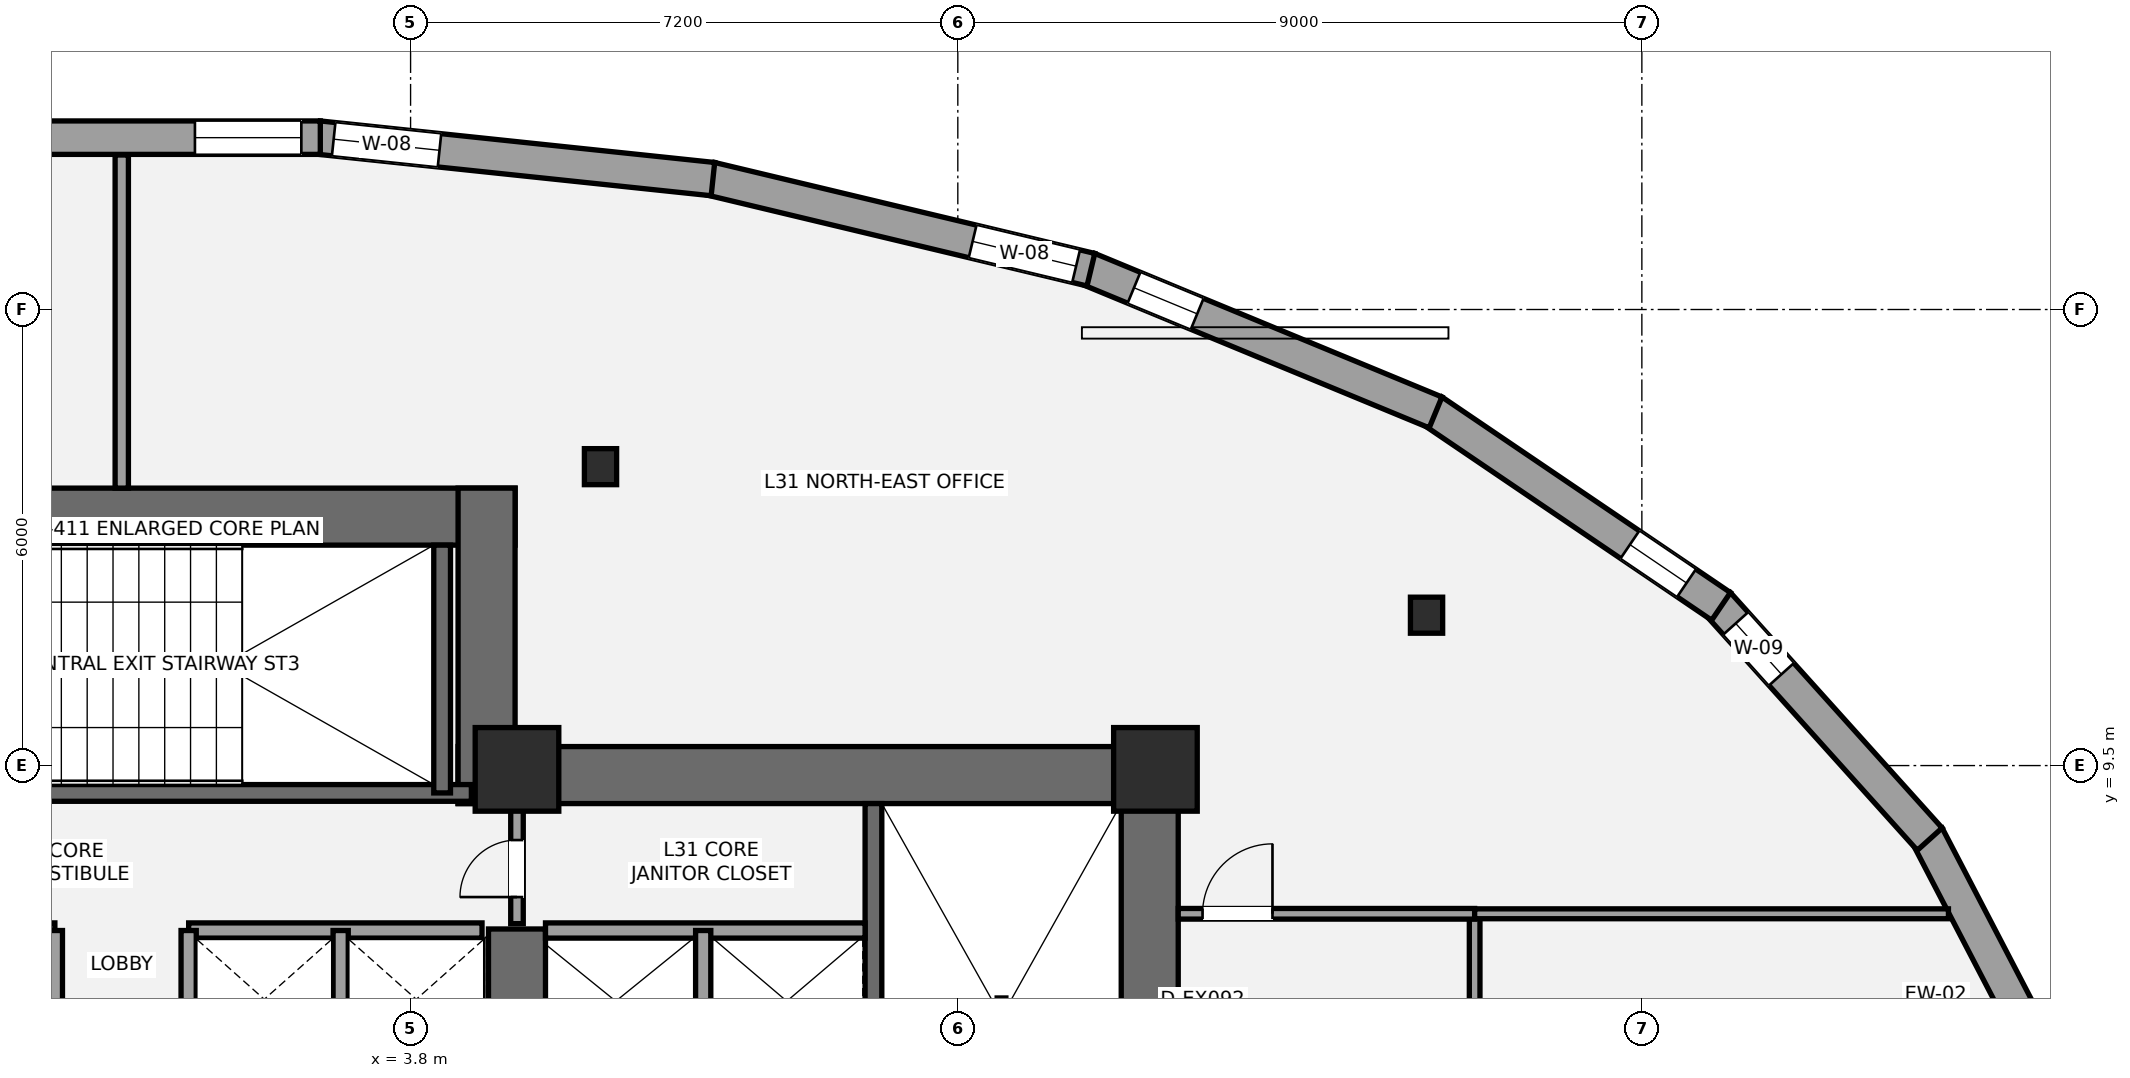
"""IFC4 building model, lengths in metres.
Left out: names, types, materials, properties, quantities, classifications, styles, units other than length and angle.
Written with IfcOpenShell. Run it as: python <this file> out.ifc"""

import sys

from ifc_helpers import new_model, si_unit, direction, frame, frame_2d, origin, origin_2d, place, context, subcontext, project, spatial, rectangle, i_section, extrude, element, fill, save


model = new_model("IFC4")
c1 = context("Model", 3, precision=1e-05, world=origin(), true_north=direction((0.0, 1.0)))
c2 = subcontext(c1, "Body", "Model", "MODEL_VIEW")
j1 = project(units=[si_unit("LENGTHUNIT", "METRE"), si_unit("PLANEANGLEUNIT", "RADIAN")], contexts=[c1])
p1 = place(None, origin())
s1 = spatial("IfcSite", under=j1, at=p1, CompositionType="ELEMENT")
p2 = place(p1, origin())
s2 = spatial("IfcBuilding", under=s1, at=p2, CompositionType="ELEMENT")
p3 = place(p2, frame((0.0, 0.0, 117.6)))
s3 = spatial("IfcBuildingStorey", under=s2, at=p3, CompositionType="ELEMENT", Elevation=117.6)
p4 = place(p3, frame((13.525, 1.1, 0.0), z_axis=(0.0, 0.0, 1.0), x_axis=(0.0, 1.0, 0.0)))
e1 = element("IfcWall", 1, at=p4, inside=s3, PredefinedType="SHEAR", context=c2, shape_type="SweptSolid", body=[
    extrude(rectangle(XDim=8.65, YDim=0.75, at=frame_2d((4.325, 0.0))), origin(), (0.0, 0.0, 1.0), 3.5),
])
p5 = place(p3, frame((4.425, 9.375, 0.0), z_axis=(0.0, 0.0, 1.0), x_axis=(1.0, 0.0, 0.0)))
e2 = element("IfcWall", 2, at=p5, inside=s3, PredefinedType="SHEAR", context=c2, shape_type="SweptSolid", body=[
    extrude(rectangle(XDim=9.475, YDim=0.75, at=frame_2d((4.737, 0.0))), origin(), (0.0, 0.0, 1.0), 3.5),
])
p6 = place(p3, frame((5.2, 5.35, 0.0), z_axis=(0.0, 0.0, 1.0), x_axis=(0.0, 1.0, 0.0)))
e3 = element("IfcWall", 3, at=p6, inside=s3, PredefinedType="SHEAR", context=c2, shape_type="SweptSolid", body=[
    extrude(rectangle(XDim=2.0, YDim=0.75, at=frame_2d((1.0, 0.0))), origin(), (0.0, 0.0, 1.0), 3.5),
])
p7 = place(p3, frame((9.89, 1.85, 0.0), z_axis=(0.0, 0.0, 1.0), x_axis=(0.0, 1.0, 0.0)))
e4 = element("IfcWall", 4, at=p7, inside=s3, PredefinedType="SHEAR", context=c2, shape_type="SweptSolid", body=[
    extrude(rectangle(XDim=7.15, YDim=0.22, at=frame_2d((3.575, 0.0))), origin(), (0.0, 0.0, 1.0), 3.5),
])
p8 = place(p3, frame((-5.175, 12.775, 0.0), z_axis=(0.0, 0.0, 1.0), x_axis=(1.0, 0.0, 0.0)))
e5 = element("IfcWall", 5, at=p8, inside=s3, PredefinedType="SHEAR", context=c2, shape_type="SweptSolid", body=[
    extrude(rectangle(XDim=10.35, YDim=0.75, at=frame_2d((5.175, 0.0))), origin(), (0.0, 0.0, 1.0), 3.5),
])
p9 = place(p3, frame((4.8, 9.0, 0.0), z_axis=(0.0, 0.0, 1.0), x_axis=(0.0, 1.0, 0.0)))
e6 = element("IfcWall", 6, at=p9, inside=s3, PredefinedType="SHEAR", context=c2, shape_type="SweptSolid", body=[
    extrude(rectangle(XDim=4.15, YDim=0.75, at=frame_2d((2.075, 0.0))), origin(), (0.0, 0.0, 1.0), 3.5),
])
p10 = place(p3, frame((-4.7, 9.14, 0.0), z_axis=(0.0, 0.0, 1.0), x_axis=(1.0, 0.0, 0.0)))
e7 = element("IfcWall", 7, at=p10, inside=s3, PredefinedType="SHEAR", context=c2, shape_type="SweptSolid", body=[
    extrude(rectangle(XDim=9.3, YDim=0.22, at=frame_2d((4.65, 0.0))), origin(), (0.0, 0.0, 1.0), 3.5),
])
p11 = place(p10, frame((1.15, 0.0, 0.0)))
e8 = element("IfcOpeningElement", 8, at=p11, cuts=e7, PredefinedType="OPENING", context=c2, shape_type="SweptSolid", body=[
    extrude(rectangle(XDim=1.05, YDim=2.15, at=frame_2d((0.525, 1.075))), frame((0.0, 0.12, 0.0), z_axis=(0.0, -1.0, 0.0), x_axis=(1.0, 0.0, 0.0)), (0.0, 0.0, 1.0), 0.24),
])
p12 = place(p3, frame((4.215, 9.14, 0.0), z_axis=(0.0, 0.0, 1.0), x_axis=(0.0, 1.0, 0.0)))
e9 = element("IfcWall", 9, at=p12, inside=s3, PredefinedType="SHEAR", context=c2, shape_type="SweptSolid", body=[
    extrude(rectangle(XDim=3.26, YDim=0.22, at=frame_2d((1.63, 0.0))), origin(), (0.0, 0.0, 1.0), 3.5),
])
for number, where, z_axis, x_axis in (
    (10, (5.2, 9.45, 0.0), (0.0, 0.0, 1.0), (1.0, 0.0, 0.0)),
    (11, (13.6, 9.45, 0.0), (0.0, 0.0, 1.0), (1.0, 0.0, 0.0)),
):
    element("IfcColumn", number, at=place(p3, frame(where, z_axis=z_axis, x_axis=x_axis)), inside=s3, PredefinedType="COLUMN", context=c2, shape_type="SweptSolid", body=[
        extrude(rectangle(XDim=1.1, YDim=1.1, at=origin_2d()), origin(), (0.0, 0.0, 1.0), 3.5),
    ])
for number, where, z_axis, x_axis in (
    (12, (17.167, 11.478, 0.0), (0.0, 0.0, 1.0), (1.0, 0.0, 0.0)),
    (13, (6.299, 13.433, 0.0), (0.0, 0.0, 1.0), (1.0, 0.0, 0.0)),
):
    element("IfcColumn", number, at=place(p3, frame(where, z_axis=z_axis, x_axis=x_axis)), inside=s3, PredefinedType="COLUMN", context=c2, shape_type="SweptSolid", body=[
        extrude(i_section(OverallWidth=0.424, OverallDepth=0.474, WebThickness=0.048, FlangeThickness=0.077, at=origin_2d()), origin(), (0.0, 0.0, 1.0), 3.5),
    ])
p13 = place(p3, frame((23.756, 8.578, 0.0), z_axis=(0.0, 0.0, 1.0), x_axis=(0.461766944701, -0.88700129018, 0.0)))
e14 = element("IfcWall", 14, at=p13, inside=s3, PredefinedType="STANDARD", context=c2, shape_type="SweptSolid", body=[
    extrude(rectangle(XDim=3.823, YDim=0.44, at=frame_2d((1.911, 0.0))), origin(), (0.0, 0.0, 1.0), 2.528),
])
p14 = place(p13, frame((2.673, 0.0, 0.58)))
e15 = element("IfcOpeningElement", 15, at=p14, cuts=e14, PredefinedType="OPENING", context=c2, shape_type="SweptSolid", body=[
    extrude(rectangle(XDim=0.9, YDim=1.35, at=frame_2d((0.45, 0.675))), frame((0.0, 0.23, 0.0), z_axis=(0.0, -1.0, 0.0), x_axis=(1.0, 0.0, 0.0)), (0.0, 0.0, 1.0), 0.46),
])
p15 = place(p3, frame((21.002, 11.629, 0.0), z_axis=(0.0, 0.0, 1.0), x_axis=(0.668754222456, -0.743483550556, 0.0)))
e16 = element("IfcWall", 16, at=p15, inside=s3, PredefinedType="STANDARD", context=c2, shape_type="SweptSolid", body=[
    extrude(rectangle(XDim=4.166, YDim=0.44, at=frame_2d((2.083, 0.0))), origin(), (0.0, 0.0, 1.0), 2.528),
])
p16 = place(p15, frame((0.348, 0.0, 0.58)))
e17 = element("IfcOpeningElement", 17, at=p16, cuts=e16, PredefinedType="OPENING", context=c2, shape_type="SweptSolid", body=[
    extrude(rectangle(XDim=0.9, YDim=1.35, at=frame_2d((0.45, 0.675))), frame((0.0, 0.23, 0.0), z_axis=(0.0, -1.0, 0.0), x_axis=(1.0, 0.0, 0.0)), (0.0, 0.0, 1.0), 0.46),
])
p17 = place(p3, frame((17.247, 14.167, 0.0), z_axis=(0.0, 0.0, 1.0), x_axis=(0.827700115196, -0.561170668607, 0.0)))
e18 = element("IfcWall", 18, at=p17, inside=s3, PredefinedType="STANDARD", context=c2, shape_type="SweptSolid", body=[
    extrude(rectangle(XDim=4.585, YDim=0.44, at=frame_2d((2.293, 0.0))), origin(), (0.0, 0.0, 1.0), 2.528),
])
p18 = place(p17, frame((3.137, 0.0, 0.58)))
e19 = element("IfcOpeningElement", 19, at=p18, cuts=e18, PredefinedType="OPENING", context=c2, shape_type="SweptSolid", body=[
    extrude(rectangle(XDim=0.9, YDim=1.35, at=frame_2d((0.45, 0.675))), frame((0.0, 0.23, 0.0), z_axis=(0.0, -1.0, 0.0), x_axis=(1.0, 0.0, 0.0)), (0.0, 0.0, 1.0), 0.46),
])
p19 = place(p3, frame((12.718, 16.034, 0.0), z_axis=(0.0, 0.0, 1.0), x_axis=(0.924140141084, -0.382053660678, 0.0)))
e20 = element("IfcWall", 20, at=p19, inside=s3, PredefinedType="STANDARD", context=c2, shape_type="SweptSolid", body=[
    extrude(rectangle(XDim=4.943, YDim=0.44, at=frame_2d((2.471, 0.0))), origin(), (0.0, 0.0, 1.0), 2.528),
])
p20 = place(p19, frame((0.649, 0.0, 0.58)))
e21 = element("IfcOpeningElement", 21, at=p20, cuts=e20, PredefinedType="OPENING", context=c2, shape_type="SweptSolid", body=[
    extrude(rectangle(XDim=0.9, YDim=1.35, at=frame_2d((0.45, 0.675))), frame((0.0, 0.23, 0.0), z_axis=(0.0, -1.0, 0.0), x_axis=(1.0, 0.0, 0.0)), (0.0, 0.0, 1.0), 0.46),
])
p21 = place(p3, frame((7.75, 17.22, 0.0), z_axis=(0.0, 0.0, 1.0), x_axis=(0.972539655933, -0.232737228734, 0.0)))
e22 = element("IfcWall", 22, at=p21, inside=s3, PredefinedType="STANDARD", context=c2, shape_type="SweptSolid", body=[
    extrude(rectangle(XDim=5.142, YDim=0.44, at=frame_2d((2.571, 0.0))), origin(), (0.0, 0.0, 1.0), 2.528),
])
p22 = place(p21, frame((3.542, 0.0, 0.58)))
e23 = element("IfcOpeningElement", 23, at=p22, cuts=e22, PredefinedType="OPENING", context=c2, shape_type="SweptSolid", body=[
    extrude(rectangle(XDim=1.4, YDim=1.55, at=frame_2d((0.7, 0.775))), frame((0.0, 0.23, 0.0), z_axis=(0.0, -1.0, 0.0), x_axis=(1.0, 0.0, 0.0)), (0.0, 0.0, 1.0), 0.46),
])
p23 = place(p3, frame((2.589, 17.762, 0.0), z_axis=(0.0, 0.0, 1.0), x_axis=(0.994501349718, -0.104723757619, 0.0)))
e24 = element("IfcWall", 24, at=p23, inside=s3, PredefinedType="STANDARD", context=c2, shape_type="SweptSolid", body=[
    extrude(rectangle(XDim=5.218, YDim=0.44, at=frame_2d((2.609, 0.0))), origin(), (0.0, 0.0, 1.0), 2.528),
])
p24 = place(p23, frame((0.2, 0.0, 0.58)))
e25 = element("IfcOpeningElement", 25, at=p24, cuts=e24, PredefinedType="OPENING", context=c2, shape_type="SweptSolid", body=[
    extrude(rectangle(XDim=1.4, YDim=1.55, at=frame_2d((0.7, 0.775))), frame((0.0, 0.23, 0.0), z_axis=(0.0, -1.0, 0.0), x_axis=(1.0, 0.0, 0.0)), (0.0, 0.0, 1.0), 0.46),
])
p25 = place(p3, frame((-2.612, 17.761, 0.0), z_axis=(0.0, 0.0, 1.0), x_axis=(1.0, 0.0, 0.0)))
e26 = element("IfcWall", 26, at=p25, inside=s3, PredefinedType="STANDARD", context=c2, shape_type="SweptSolid", body=[
    extrude(rectangle(XDim=5.225, YDim=0.44, at=frame_2d((2.612, 0.0))), origin(), (0.0, 0.0, 1.0), 2.528),
])
p26 = place(p25, frame((3.575, 0.0, 0.58)))
e27 = element("IfcOpeningElement", 27, at=p26, cuts=e26, PredefinedType="OPENING", context=c2, shape_type="SweptSolid", body=[
    extrude(rectangle(XDim=1.4, YDim=1.55, at=frame_2d((0.7, 0.775))), frame((0.0, 0.23, 0.0), z_axis=(0.0, -1.0, 0.0), x_axis=(1.0, 0.0, 0.0)), (0.0, 0.0, 1.0), 0.46),
])
p27 = place(p3, frame((5.575, 7.33, 0.0), z_axis=(0.0, 0.0, 1.0), x_axis=(1.0, 0.0, 0.0)))
e28 = element("IfcWall", 28, at=p27, inside=s3, PredefinedType="SOLIDWALL", context=c2, shape_type="SweptSolid", body=[
    extrude(rectangle(XDim=4.205, YDim=0.2, at=frame_2d((2.103, 0.0))), origin(), (0.0, 0.0, 1.0), 3.31),
])
p28 = place(p3, frame((7.65, 5.47, 0.0), z_axis=(0.0, 0.0, 1.0), x_axis=(0.0, 1.0, 0.0)))
e29 = element("IfcWall", 29, at=p28, inside=s3, PredefinedType="SOLIDWALL", context=c2, shape_type="SweptSolid", body=[
    extrude(rectangle(XDim=1.86, YDim=0.2, at=frame_2d((0.93, 0.0))), origin(), (0.0, 0.0, 1.0), 3.31),
])
for number, where, z_axis, x_axis in (
    (30, (-4.74, 7.33, 0.0), (0.0, 0.0, 1.0), (1.0, 0.0, 0.0)),
    (31, (0.88, 7.33, 0.0), (0.0, 0.0, 1.0), (1.0, 0.0, 0.0)),
):
    element("IfcWall", number, at=place(p3, frame(where, z_axis=z_axis, x_axis=x_axis)), inside=s3, PredefinedType="SOLIDWALL", context=c2, shape_type="SweptSolid", body=[
        extrude(rectangle(XDim=3.86, YDim=0.2, at=frame_2d((1.93, 0.0))), origin(), (0.0, 0.0, 1.0), 3.31),
    ])
for number, where, z_axis, x_axis in (
    (32, (2.88, 5.52, 0.0), (0.0, 0.0, 1.0), (0.0, 1.0, 0.0)),
    (33, (-0.88, 5.52, 0.0), (0.0, 0.0, 1.0), (0.0, 1.0, 0.0)),
    (34, (0.88, 5.52, 0.0), (0.0, 0.0, 1.0), (0.0, 1.0, 0.0)),
):
    element("IfcWall", number, at=place(p3, frame(where, z_axis=z_axis, x_axis=x_axis)), inside=s3, PredefinedType="SOLIDWALL", context=c2, shape_type="SweptSolid", body=[
        extrude(rectangle(XDim=1.81, YDim=0.2, at=frame_2d((0.905, 0.0))), origin(), (0.0, 0.0, 1.0), 3.31),
    ])
p29 = place(p3, frame((5.2, 7.42, 0.0), z_axis=(0.0, 0.0, 1.0), x_axis=(0.0, 1.0, 0.0)))
e35 = element("IfcWall", 35, at=p29, inside=s3, PredefinedType="PARTITIONING", context=c2, shape_type="SweptSolid", body=[
    extrude(rectangle(XDim=1.58, YDim=0.165, at=frame_2d((0.79, 0.0))), origin(), (0.0, 0.0, 1.0), 3.31),
])
p30 = place(p29, frame((0.35, 0.0, 0.0)))
e36 = element("IfcOpeningElement", 36, at=p30, cuts=e35, PredefinedType="OPENING", context=c2, shape_type="SweptSolid", body=[
    extrude(rectangle(XDim=0.75, YDim=2.1, at=frame_2d((0.375, 1.05))), frame((0.0, 0.093, 0.0), z_axis=(0.0, -1.0, 0.0), x_axis=(1.0, 0.0, 0.0)), (0.0, 0.0, 1.0), 0.185),
])
p31 = place(p3, frame((17.8, -13.517, 0.0), z_axis=(0.0, 0.0, 1.0), x_axis=(0.0, 1.0, 0.0)))
e37 = element("IfcWall", 37, at=p31, inside=s3, PredefinedType="PARTITIONING", context=c2, shape_type="SweptSolid", body=[
    extrude(rectangle(XDim=21.067, YDim=0.14, at=frame_2d((10.533, 0.0))), origin(), (0.0, 0.0, 1.0), 2.688),
])
p32 = place(p31, frame((11.167, 0.0, 0.0)))
e38 = element("IfcOpeningElement", 38, at=p32, cuts=e37, PredefinedType="OPENING", context=c2, shape_type="SweptSolid", body=[
    extrude(rectangle(XDim=0.9, YDim=2.1, at=frame_2d((0.45, 1.05))), frame((0.0, 0.08, 0.0), z_axis=(0.0, -1.0, 0.0), x_axis=(1.0, 0.0, 0.0)), (0.0, 0.0, 1.0), 0.16),
])
p33 = place(p31, frame((18.042, 0.0, 0.0)))
e39 = element("IfcOpeningElement", 39, at=p33, cuts=e37, PredefinedType="OPENING", context=c2, shape_type="SweptSolid", body=[
    extrude(rectangle(XDim=0.9, YDim=2.1, at=frame_2d((0.45, 1.05))), frame((0.0, 0.08, 0.0), z_axis=(0.0, -1.0, 0.0), x_axis=(1.0, 0.0, 0.0)), (0.0, 0.0, 1.0), 0.16),
])
p34 = place(p3, frame((13.9, 7.55, 0.0), z_axis=(0.0, 0.0, 1.0), x_axis=(1.0, 0.0, 0.0)))
e40 = element("IfcWall", 40, at=p34, inside=s3, PredefinedType="PARTITIONING", context=c2, shape_type="SweptSolid", body=[
    extrude(rectangle(XDim=3.9, YDim=0.14, at=frame_2d((1.95, 0.0))), origin(), (0.0, 0.0, 1.0), 2.763),
])
p35 = place(p34, frame((0.32, 0.0, 0.0)))
e41 = element("IfcOpeningElement", 41, at=p35, cuts=e40, PredefinedType="OPENING", context=c2, shape_type="SweptSolid", body=[
    extrude(rectangle(XDim=0.92, YDim=2.15, at=frame_2d((0.46, 1.075))), frame((0.0, 0.08, 0.0), z_axis=(0.0, -1.0, 0.0), x_axis=(1.0, 0.0, 0.0)), (0.0, 0.0, 1.0), 0.16),
])
p36 = place(p3, frame((0.0, 13.15, 0.0), z_axis=(0.0, 0.0, 1.0), x_axis=(0.0, 1.0, 0.0)))
e42 = element("IfcWall", 42, at=p36, inside=s3, PredefinedType="PARTITIONING", context=c2, shape_type="SweptSolid", body=[
    extrude(rectangle(XDim=4.383, YDim=0.175, at=frame_2d((2.191, 0.0))), origin(), (0.0, 0.0, 1.0), 3.31),
])
p37 = place(p3, frame((17.8, 7.55, 0.0), z_axis=(0.0, 0.0, 1.0), x_axis=(1.0, 0.0, 0.0)))
e43 = element("IfcWall", 43, at=p37, inside=s3, PredefinedType="PARTITIONING", context=c2, shape_type="SweptSolid", body=[
    extrude(rectangle(XDim=6.234, YDim=0.13, at=frame_2d((3.117, 0.0))), origin(), (0.0, 0.0, 1.0), 2.763),
])
p38 = place(p16, origin())
e44 = element("IfcWindow", 44, at=p38, inside=s3, PartitioningType="SINGLE_PANEL", PredefinedType="WINDOW", context=c2, shape_type="SweptSolid", body=[
    extrude(rectangle(XDim=0.9, YDim=1.35, at=frame_2d((0.45, 0.675))), frame((0.0, -0.01, 0.0), z_axis=(0.0, -1.0, 0.0), x_axis=(1.0, 0.0, 0.0)), (0.0, 0.0, 1.0), 0.06),
])
fill(e17, e44)
p39 = place(p18, origin())
e45 = element("IfcWindow", 45, at=p39, inside=s3, PartitioningType="SINGLE_PANEL", PredefinedType="WINDOW", context=c2, shape_type="SweptSolid", body=[
    extrude(rectangle(XDim=0.9, YDim=1.35, at=frame_2d((0.45, 0.675))), frame((0.0, -0.01, 0.0), z_axis=(0.0, -1.0, 0.0), x_axis=(1.0, 0.0, 0.0)), (0.0, 0.0, 1.0), 0.06),
])
fill(e19, e45)
p40 = place(p20, origin())
e46 = element("IfcWindow", 46, at=p40, inside=s3, PartitioningType="SINGLE_PANEL", PredefinedType="WINDOW", context=c2, shape_type="SweptSolid", body=[
    extrude(rectangle(XDim=0.9, YDim=1.35, at=frame_2d((0.45, 0.675))), frame((0.0, -0.01, 0.0), z_axis=(0.0, -1.0, 0.0), x_axis=(1.0, 0.0, 0.0)), (0.0, 0.0, 1.0), 0.06),
])
fill(e21, e46)
p41 = place(p22, origin())
e47 = element("IfcWindow", 47, at=p41, inside=s3, PartitioningType="SINGLE_PANEL", PredefinedType="WINDOW", context=c2, shape_type="SweptSolid", body=[
    extrude(rectangle(XDim=1.4, YDim=1.55, at=frame_2d((0.7, 0.775))), frame((0.0, -0.01, 0.0), z_axis=(0.0, -1.0, 0.0), x_axis=(1.0, 0.0, 0.0)), (0.0, 0.0, 1.0), 0.06),
])
fill(e23, e47)
p42 = place(p24, origin())
e48 = element("IfcWindow", 48, at=p42, inside=s3, PartitioningType="SINGLE_PANEL", PredefinedType="WINDOW", context=c2, shape_type="SweptSolid", body=[
    extrude(rectangle(XDim=1.4, YDim=1.55, at=frame_2d((0.7, 0.775))), frame((0.0, -0.01, 0.0), z_axis=(0.0, -1.0, 0.0), x_axis=(1.0, 0.0, 0.0)), (0.0, 0.0, 1.0), 0.06),
])
fill(e25, e48)
p43 = place(p26, origin())
e49 = element("IfcWindow", 49, at=p43, inside=s3, PartitioningType="SINGLE_PANEL", PredefinedType="WINDOW", context=c2, shape_type="SweptSolid", body=[
    extrude(rectangle(XDim=1.4, YDim=1.55, at=frame_2d((0.7, 0.775))), frame((0.0, -0.01, 0.0), z_axis=(0.0, -1.0, 0.0), x_axis=(1.0, 0.0, 0.0)), (0.0, 0.0, 1.0), 0.06),
])
fill(e27, e49)
p44 = place(p30, origin())
e50 = element("IfcDoor", 50, at=p44, inside=s3, OperationType="SINGLE_SWING_LEFT", PredefinedType="DOOR", context=c2, shape_type="SweptSolid", body=[
    extrude(rectangle(XDim=0.75, YDim=2.1, at=frame_2d((0.375, 1.05))), frame((0.0, 0.025, 0.0), z_axis=(0.0, -1.0, 0.0), x_axis=(1.0, 0.0, 0.0)), (0.0, 0.0, 1.0), 0.05),
])
fill(e36, e50)
p45 = place(p35, origin())
e51 = element("IfcDoor", 51, at=p45, inside=s3, OperationType="SINGLE_SWING_RIGHT", PredefinedType="DOOR", context=c2, shape_type="SweptSolid", body=[
    extrude(rectangle(XDim=0.92, YDim=2.15, at=frame_2d((0.46, 1.075))), frame((0.0, 0.025, 0.0), z_axis=(0.0, -1.0, 0.0), x_axis=(1.0, 0.0, 0.0)), (0.0, 0.0, 1.0), 0.05),
])
fill(e41, e51)
save(model, sys.argv[1])
